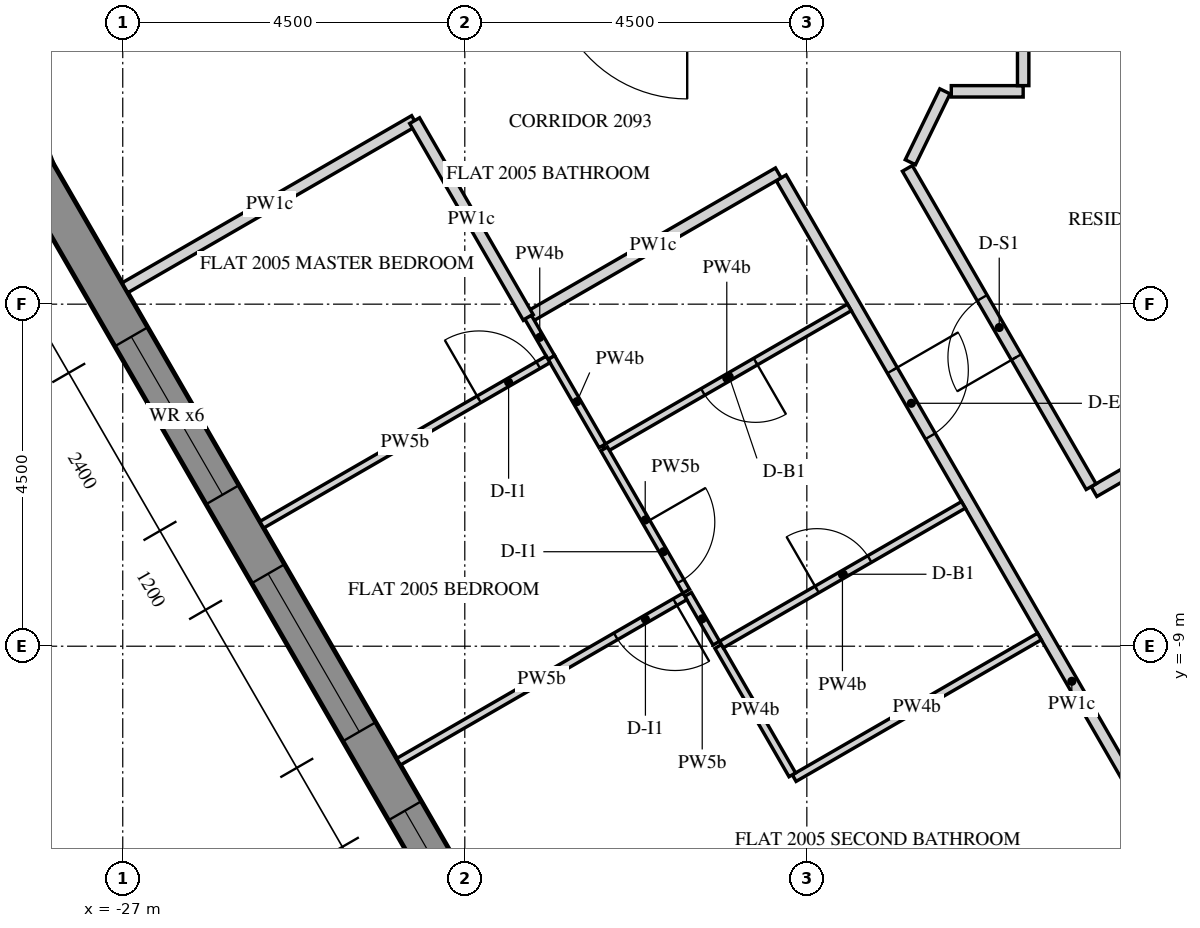
"""IFC4 building model, lengths in metres.
Left out: names, types, materials, properties, quantities, classifications, styles, units other than length and angle.
Written with IfcOpenShell. Run it as: python <this file> out.ifc"""

import sys

from ifc_helpers import new_model, si_unit, direction, frame, frame_2d, origin, place, context, subcontext, project, spatial, polyline, rectangle, outline, extrude, element, fill, save


model = new_model("IFC4")
c1 = context("Model", 3, precision=1e-05, world=origin(), true_north=direction((0.0, 1.0)))
c2 = subcontext(c1, "Body", "Model", "MODEL_VIEW")
j1 = project(units=[si_unit("LENGTHUNIT", "METRE"), si_unit("PLANEANGLEUNIT", "RADIAN")], contexts=[c1])
p1 = place(None, origin())
s1 = spatial("IfcSite", under=j1, at=p1, CompositionType="ELEMENT")
p2 = place(p1, origin())
s2 = spatial("IfcBuilding", under=s1, at=p2, CompositionType="ELEMENT")
p3 = place(p2, frame((0.0, 0.0, 260.1)))
s3 = spatial("IfcBuildingStorey", under=s2, at=p3, CompositionType="ELEMENT", Elevation=260.1)
p4 = place(p3, frame((-28.578, -1.606, -0.15), z_axis=(0.0, 0.0, 1.0), x_axis=(0.352838463023, -0.935684251771, 0.0)))
e1 = element("IfcWall", 1, at=p4, inside=s3, PredefinedType="SOLIDWALL", context=c2, shape_type="SweptSolid", body=[
    extrude(outline(polyline([(-0.041, -0.25), (1.237, -0.25), (1.196, 0.25), (0.041, 0.25), (-0.041, -0.25)])), origin(), (0.0, 0.0, 1.0), 3.9),
])
p5 = place(p3, frame((-28.149, -2.745, -0.15), z_axis=(0.0, 0.0, 1.0), x_axis=(0.500003737743, -0.866023245787, 0.0)))
e2 = element("IfcWall", 2, at=p5, inside=s3, PredefinedType="SOLIDWALL", context=c2, shape_type="SweptSolid", body=[
    extrude(outline(polyline([(-0.021, -0.25), (25.468, -0.25), (25.421, 0.25), (0.021, 0.25), (-0.021, -0.25)])), origin(), (0.0, 0.0, 1.0), 3.9),
])
p6 = place(p5, frame((2.522, 0.0, 0.75)))
e3 = element("IfcOpeningElement", 3, at=p6, cuts=e2, PredefinedType="OPENING", context=c2, shape_type="SweptSolid", body=[
    extrude(rectangle(XDim=2.4, YDim=2.7, at=frame_2d((1.2, 1.35))), frame((0.0, 0.26, 0.0), z_axis=(0.0, -1.0, 0.0), x_axis=(1.0, 0.0, 0.0)), (0.0, 0.0, 1.0), 0.52),
])
p7 = place(p5, frame((6.122, 0.0, 0.75)))
e4 = element("IfcOpeningElement", 4, at=p7, cuts=e2, PredefinedType="OPENING", context=c2, shape_type="SweptSolid", body=[
    extrude(rectangle(XDim=2.4, YDim=2.7, at=frame_2d((1.2, 1.35))), frame((0.0, 0.26, 0.0), z_axis=(0.0, -1.0, 0.0), x_axis=(1.0, 0.0, 0.0)), (0.0, 0.0, 1.0), 0.52),
])
p8 = place(p5, frame((9.722, 0.0, 0.75)))
e5 = element("IfcOpeningElement", 5, at=p8, cuts=e2, PredefinedType="OPENING", context=c2, shape_type="SweptSolid", body=[
    extrude(rectangle(XDim=2.4, YDim=2.7, at=frame_2d((1.2, 1.35))), frame((0.0, 0.26, 0.0), z_axis=(0.0, -1.0, 0.0), x_axis=(1.0, 0.0, 0.0)), (0.0, 0.0, 1.0), 0.52),
])
p9 = place(p5, frame((13.323, 0.0, 0.75)))
e6 = element("IfcOpeningElement", 6, at=p9, cuts=e2, PredefinedType="OPENING", context=c2, shape_type="SweptSolid", body=[
    extrude(rectangle(XDim=2.4, YDim=2.7, at=frame_2d((1.2, 1.35))), frame((0.0, 0.26, 0.0), z_axis=(0.0, -1.0, 0.0), x_axis=(1.0, 0.0, 0.0)), (0.0, 0.0, 1.0), 0.52),
])
p10 = place(p5, frame((16.922, 0.0, 0.75)))
e7 = element("IfcOpeningElement", 7, at=p10, cuts=e2, PredefinedType="OPENING", context=c2, shape_type="SweptSolid", body=[
    extrude(rectangle(XDim=2.4, YDim=2.7, at=frame_2d((1.2, 1.35))), frame((0.0, 0.26, 0.0), z_axis=(0.0, -1.0, 0.0), x_axis=(1.0, 0.0, 0.0)), (0.0, 0.0, 1.0), 0.52),
])
p11 = place(p5, frame((20.522, 0.0, 0.75)))
e8 = element("IfcOpeningElement", 8, at=p11, cuts=e2, PredefinedType="OPENING", context=c2, shape_type="SweptSolid", body=[
    extrude(rectangle(XDim=2.4, YDim=2.7, at=frame_2d((1.2, 1.35))), frame((0.0, 0.26, 0.0), z_axis=(0.0, -1.0, 0.0), x_axis=(1.0, 0.0, 0.0)), (0.0, 0.0, 1.0), 0.52),
])
p12 = place(p3, frame((-18.338, -2.838, 0.0), z_axis=(0.0, 0.0, 1.0), x_axis=(0.499999693481, -0.866025580753, 0.0)))
e9 = element("IfcWall", 9, at=p12, inside=s3, PredefinedType="PARTITIONING", context=c2, shape_type="SweptSolid", body=[
    extrude(rectangle(XDim=15.296, YDim=0.15, at=frame_2d((7.648, 0.0))), origin(), (0.0, 0.0, 1.0), 2.823),
])
p13 = place(p12, frame((2.925, 0.0, 0.0)))
e10 = element("IfcOpeningElement", 10, at=p13, cuts=e9, PredefinedType="OPENING", context=c2, shape_type="SweptSolid", body=[
    extrude(rectangle(XDim=1.0, YDim=2.1, at=frame_2d((0.5, 1.05))), frame((0.0, 0.085, 0.0), z_axis=(0.0, -1.0, 0.0), x_axis=(1.0, 0.0, 0.0)), (0.0, 0.0, 1.0), 0.17),
])
p14 = place(p12, frame((14.136, 0.0, 0.0)))
e11 = element("IfcOpeningElement", 11, at=p14, cuts=e9, PredefinedType="OPENING", context=c2, shape_type="SweptSolid", body=[
    extrude(rectangle(XDim=1.0, YDim=2.1, at=frame_2d((0.5, 1.05))), frame((0.0, 0.085, 0.0), z_axis=(0.0, -1.0, 0.0), x_axis=(1.0, 0.0, 0.0)), (0.0, 0.0, 1.0), 0.17),
])
p15 = place(p3, frame((-21.666, -4.673, 0.0), z_axis=(0.0, 0.0, 1.0), x_axis=(0.86601654697, 0.500015340139, 0.0)))
e12 = element("IfcWall", 12, at=p15, inside=s3, PredefinedType="PARTITIONING", context=c2, shape_type="SweptSolid", body=[
    extrude(rectangle(XDim=3.8, YDim=0.15, at=frame_2d((1.9, 0.0))), origin(), (0.0, 0.0, 1.0), 2.823),
])
p16 = place(p3, frame((-26.971, -4.284, 0.0), z_axis=(0.0, 0.0, 1.0), x_axis=(0.866010893236, 0.500025132165, 0.0)))
e13 = element("IfcWall", 13, at=p16, inside=s3, PredefinedType="PARTITIONING", context=c2, shape_type="SweptSolid", body=[
    extrude(rectangle(XDim=4.399, YDim=0.15, at=frame_2d((2.199, 0.0))), origin(), (0.0, 0.0, 1.0), 2.823),
])
p17 = place(p3, frame((-23.16, -2.085, 0.0), z_axis=(0.0, 0.0, 1.0), x_axis=(0.499983857782, -0.866034723298, 0.0)))
e14 = element("IfcWall", 14, at=p17, inside=s3, PredefinedType="PARTITIONING", context=c2, shape_type="SweptSolid", body=[
    extrude(rectangle(XDim=2.991, YDim=0.15, at=frame_2d((1.496, 0.0))), origin(), (0.0, 0.0, 1.0), 2.823),
])
p18 = place(p3, frame((-10.066, -4.566, 0.0), z_axis=(0.0, 0.0, 1.0), x_axis=(-0.866037363387, -0.499979284789, 0.0)))
e15 = element("IfcWall", 15, at=p18, inside=s3, PredefinedType="PARTITIONING", context=c2, shape_type="SweptSolid", body=[
    extrude(rectangle(XDim=4.8, YDim=0.15, at=frame_2d((2.4, 0.0))), origin(), (0.0, 0.0, 1.0), 2.823),
])
p19 = place(p3, frame((-14.26, -6.901, 0.0), z_axis=(0.0, 0.0, 1.0), x_axis=(-0.499978899972, 0.866037585549, 0.0)))
e16 = element("IfcWall", 16, at=p19, inside=s3, PredefinedType="PARTITIONING", context=c2, shape_type="SweptSolid", body=[
    extrude(rectangle(XDim=4.835, YDim=0.15, at=frame_2d((2.417, 0.0))), origin(), (0.0, 0.0, 1.0), 2.823),
])
p20 = place(p19, frame((1.967, 0.0, 0.0)))
e17 = element("IfcOpeningElement", 17, at=p20, cuts=e16, PredefinedType="OPENING", context=c2, shape_type="SweptSolid", body=[
    extrude(rectangle(XDim=0.9, YDim=2.1, at=frame_2d((0.45, 1.05))), frame((0.0, 0.085, 0.0), z_axis=(0.0, -1.0, 0.0), x_axis=(1.0, 0.0, 0.0)), (0.0, 0.0, 1.0), 0.17),
])
p21 = place(p3, frame((-16.638, -2.632, 0.0), z_axis=(0.0, 0.0, 1.0), x_axis=(0.438437541994, 0.898761660158, 0.0)))
e18 = element("IfcWall", 18, at=p21, inside=s3, PredefinedType="PARTITIONING", context=c2, shape_type="SweptSolid", body=[
    extrude(rectangle(XDim=1.037, YDim=0.15, at=frame_2d((0.519, 0.0))), origin(), (0.0, 0.0, 1.0), 2.823),
])
p22 = place(p3, frame((-16.1, -1.7, 0.0), z_axis=(0.0, 0.0, 1.0), x_axis=(1.0, 0.0, 0.0)))
e19 = element("IfcWall", 19, at=p22, inside=s3, PredefinedType="PARTITIONING", context=c2, shape_type="SweptSolid", body=[
    extrude(rectangle(XDim=0.946, YDim=0.15, at=frame_2d((0.473, 0.0))), origin(), (0.0, 0.0, 1.0), 2.823),
])
p23 = place(p3, frame((-15.154, -1.625, 0.0), z_axis=(0.0, 0.0, 1.0), x_axis=(0.0, 1.0, 0.0)))
e20 = element("IfcWall", 20, at=p23, inside=s3, PredefinedType="PARTITIONING", context=c2, shape_type="SweptSolid", body=[
    extrude(rectangle(XDim=1.425, YDim=0.15, at=frame_2d((0.712, 0.0))), origin(), (0.0, 0.0, 1.0), 2.823),
])
p24 = place(p3, frame((-19.191, -8.96, 0.0), z_axis=(0.0, 0.0, 1.0), x_axis=(-0.500036104519, 0.866004557827, 0.0)))
e21 = element("IfcWall", 21, at=p24, inside=s3, PredefinedType="PARTITIONING", context=c2, shape_type="SweptSolid", body=[
    extrude(rectangle(XDim=0.741, YDim=0.1, at=frame_2d((0.371, 0.0))), origin(), (0.0, 0.0, 1.0), 2.823),
])
p25 = place(p3, frame((-19.604, -8.345, 0.0), z_axis=(0.0, 0.0, 1.0), x_axis=(-0.866027639635, -0.499996127374, 0.0)))
e22 = element("IfcWall", 22, at=p25, inside=s3, PredefinedType="PARTITIONING", context=c2, shape_type="SweptSolid", body=[
    extrude(rectangle(XDim=4.35, YDim=0.1, at=frame_2d((2.175, 0.0))), origin(), (0.0, 0.0, 1.0), 2.823),
])
p26 = place(p25, frame((0.15, 0.0, 0.0)))
e23 = element("IfcOpeningElement", 23, at=p26, cuts=e22, PredefinedType="OPENING", context=c2, shape_type="SweptSolid", body=[
    extrude(rectangle(XDim=0.9, YDim=2.1, at=frame_2d((0.45, 1.05))), frame((0.0, 0.06, 0.0), z_axis=(0.0, -1.0, 0.0), x_axis=(1.0, 0.0, 0.0)), (0.0, 0.0, 1.0), 0.12),
])
p27 = place(p3, frame((-14.94, -8.873, 0.0), z_axis=(0.0, 0.0, 1.0), x_axis=(-0.866056803351, -0.499945610411, 0.0)))
e24 = element("IfcWall", 24, at=p27, inside=s3, PredefinedType="PARTITIONING", context=c2, shape_type="SweptSolid", body=[
    extrude(rectangle(XDim=3.725, YDim=0.1, at=frame_2d((1.863, 0.0))), origin(), (0.0, 0.0, 1.0), 2.823),
])
p28 = place(p3, frame((-18.191, -10.692, 0.0), z_axis=(0.0, 0.0, 1.0), x_axis=(-0.500043961785, 0.866000020948, 0.0)))
e25 = element("IfcWall", 25, at=p28, inside=s3, PredefinedType="PARTITIONING", context=c2, shape_type="SweptSolid", body=[
    extrude(rectangle(XDim=1.95, YDim=0.1, at=frame_2d((0.975, 0.0))), origin(), (0.0, 0.0, 1.0), 2.823),
])
p29 = place(p3, frame((-17.44, -4.542, 0.0), z_axis=(0.0, 0.0, 1.0), x_axis=(-0.866028424924, -0.499994767197, 0.0)))
e26 = element("IfcWall", 26, at=p29, inside=s3, PredefinedType="PARTITIONING", context=c2, shape_type="SweptSolid", body=[
    extrude(rectangle(XDim=3.725, YDim=0.1, at=frame_2d((1.863, 0.0))), origin(), (0.0, 0.0, 1.0), 2.823),
])
p30 = place(p29, frame((1.425, 0.0, 0.0)))
e27 = element("IfcOpeningElement", 27, at=p30, cuts=e26, PredefinedType="OPENING", context=c2, shape_type="SweptSolid", body=[
    extrude(rectangle(XDim=0.8, YDim=2.1, at=frame_2d((0.4, 1.05))), frame((0.0, 0.06, 0.0), z_axis=(0.0, -1.0, 0.0), x_axis=(1.0, 0.0, 0.0)), (0.0, 0.0, 1.0), 0.12),
])
p31 = place(p3, frame((-20.667, -6.403, 0.0), z_axis=(0.0, 0.0, 1.0), x_axis=(0.499999270699, -0.866025824846, 0.0)))
e28 = element("IfcWall", 28, at=p31, inside=s3, PredefinedType="PARTITIONING", context=c2, shape_type="SweptSolid", body=[
    extrude(rectangle(XDim=2.163, YDim=0.1, at=frame_2d((1.082, 0.0))), origin(), (0.0, 0.0, 1.0), 2.823),
])
p32 = place(p31, frame((1.113, 0.0, 0.0)))
e29 = element("IfcOpeningElement", 29, at=p32, cuts=e28, PredefinedType="OPENING", context=c2, shape_type="SweptSolid", body=[
    extrude(rectangle(XDim=0.9, YDim=2.1, at=frame_2d((0.45, 1.05))), frame((0.0, 0.06, 0.0), z_axis=(0.0, -1.0, 0.0), x_axis=(1.0, 0.0, 0.0)), (0.0, 0.0, 1.0), 0.12),
])
p33 = place(p3, frame((-19.123, -8.978, 0.0), z_axis=(0.0, 0.0, 1.0), x_axis=(0.866006363297, 0.500032977642, 0.0)))
e30 = element("IfcWall", 30, at=p33, inside=s3, PredefinedType="PARTITIONING", context=c2, shape_type="SweptSolid", body=[
    extrude(rectangle(XDim=3.675, YDim=0.1, at=frame_2d((1.837, 0.0))), origin(), (0.0, 0.0, 1.0), 2.823),
])
p34 = place(p33, frame((1.45, 0.0, 0.0)))
e31 = element("IfcOpeningElement", 31, at=p34, cuts=e30, PredefinedType="OPENING", context=c2, shape_type="SweptSolid", body=[
    extrude(rectangle(XDim=0.8, YDim=2.1, at=frame_2d((0.4, 1.05))), frame((0.0, 0.06, 0.0), z_axis=(0.0, -1.0, 0.0), x_axis=(1.0, 0.0, 0.0)), (0.0, 0.0, 1.0), 0.12),
])
p35 = place(p3, frame((-21.667, -4.671, 0.0), z_axis=(0.0, 0.0, 1.0), x_axis=(0.499952348839, -0.866052913447, 0.0)))
e32 = element("IfcWall", 32, at=p35, inside=s3, PredefinedType="PARTITIONING", context=c2, shape_type="SweptSolid", body=[
    extrude(rectangle(XDim=0.613, YDim=0.1, at=frame_2d((0.306, 0.0))), origin(), (0.0, 0.0, 1.0), 2.823),
])
p36 = place(p3, frame((-21.361, -5.202, 0.0), z_axis=(0.0, 0.0, 1.0), x_axis=(0.500074377092, -0.865982457891, 0.0)))
e33 = element("IfcWall", 33, at=p36, inside=s3, PredefinedType="PARTITIONING", context=c2, shape_type="SweptSolid", body=[
    extrude(rectangle(XDim=1.341, YDim=0.1, at=frame_2d((0.67, 0.0))), origin(), (0.0, 0.0, 1.0), 2.823),
])
p37 = place(p3, frame((-25.171, -7.402, 0.0), z_axis=(0.0, 0.0, 1.0), x_axis=(0.866013608182, 0.500020430026, 0.0)))
e34 = element("IfcWall", 34, at=p37, inside=s3, PredefinedType="PARTITIONING", context=c2, shape_type="SweptSolid", body=[
    extrude(rectangle(XDim=4.35, YDim=0.1, at=frame_2d((2.175, 0.0))), origin(), (0.0, 0.0, 1.0), 2.823),
])
p38 = place(p37, frame((3.3, 0.0, 0.0)))
e35 = element("IfcOpeningElement", 35, at=p38, cuts=e34, PredefinedType="OPENING", context=c2, shape_type="SweptSolid", body=[
    extrude(rectangle(XDim=0.9, YDim=2.1, at=frame_2d((0.45, 1.05))), frame((0.0, 0.06, 0.0), z_axis=(0.0, -1.0, 0.0), x_axis=(1.0, 0.0, 0.0)), (0.0, 0.0, 1.0), 0.12),
])
p39 = place(p6, frame((0.0, 0.18, 0.0)))
e36 = element("IfcWindow", 36, at=p39, inside=s3, PartitioningType="DOUBLE_PANEL_VERTICAL", PredefinedType="WINDOW", context=c2, shape_type="SweptSolid", body=[
    extrude(rectangle(XDim=2.4, YDim=2.7, at=frame_2d((1.2, 1.35))), frame((0.0, 0.03, 0.0), z_axis=(0.0, -1.0, 0.0), x_axis=(1.0, 0.0, 0.0)), (0.0, 0.0, 1.0), 0.06),
])
fill(e3, e36)
p40 = place(p7, frame((0.0, 0.18, 0.0)))
e37 = element("IfcWindow", 37, at=p40, inside=s3, PartitioningType="DOUBLE_PANEL_VERTICAL", PredefinedType="WINDOW", context=c2, shape_type="SweptSolid", body=[
    extrude(rectangle(XDim=2.4, YDim=2.7, at=frame_2d((1.2, 1.35))), frame((0.0, 0.03, 0.0), z_axis=(0.0, -1.0, 0.0), x_axis=(1.0, 0.0, 0.0)), (0.0, 0.0, 1.0), 0.06),
])
fill(e4, e37)
p41 = place(p8, frame((0.0, 0.18, 0.0)))
e38 = element("IfcWindow", 38, at=p41, inside=s3, PartitioningType="DOUBLE_PANEL_VERTICAL", PredefinedType="WINDOW", context=c2, shape_type="SweptSolid", body=[
    extrude(rectangle(XDim=2.4, YDim=2.7, at=frame_2d((1.2, 1.35))), frame((0.0, 0.03, 0.0), z_axis=(0.0, -1.0, 0.0), x_axis=(1.0, 0.0, 0.0)), (0.0, 0.0, 1.0), 0.06),
])
fill(e5, e38)
p42 = place(p13, origin())
e39 = element("IfcDoor", 39, at=p42, inside=s3, OperationType="SINGLE_SWING_RIGHT", PredefinedType="DOOR", context=c2, shape_type="SweptSolid", body=[
    extrude(rectangle(XDim=1.0, YDim=2.1, at=frame_2d((0.5, 1.05))), frame((0.0, 0.025, 0.0), z_axis=(0.0, -1.0, 0.0), x_axis=(1.0, 0.0, 0.0)), (0.0, 0.0, 1.0), 0.05),
])
fill(e10, e39)
p43 = place(p30, origin())
e40 = element("IfcDoor", 40, at=p43, inside=s3, OperationType="SINGLE_SWING_RIGHT", PredefinedType="DOOR", context=c2, shape_type="SweptSolid", body=[
    extrude(rectangle(XDim=0.8, YDim=2.1, at=frame_2d((0.4, 1.05))), frame((0.0, 0.025, 0.0), z_axis=(0.0, -1.0, 0.0), x_axis=(1.0, 0.0, 0.0)), (0.0, 0.0, 1.0), 0.05),
])
fill(e27, e40)
p44 = place(p32, origin())
e41 = element("IfcDoor", 41, at=p44, inside=s3, OperationType="SINGLE_SWING_RIGHT", PredefinedType="DOOR", context=c2, shape_type="SweptSolid", body=[
    extrude(rectangle(XDim=0.9, YDim=2.1, at=frame_2d((0.45, 1.05))), frame((0.0, 0.025, 0.0), z_axis=(0.0, -1.0, 0.0), x_axis=(1.0, 0.0, 0.0)), (0.0, 0.0, 1.0), 0.05),
])
fill(e29, e41)
p45 = place(p38, origin())
e42 = element("IfcDoor", 42, at=p45, inside=s3, OperationType="SINGLE_SWING_RIGHT", PredefinedType="DOOR", context=c2, shape_type="SweptSolid", body=[
    extrude(rectangle(XDim=0.9, YDim=2.1, at=frame_2d((0.45, 1.05))), frame((0.0, 0.025, 0.0), z_axis=(0.0, -1.0, 0.0), x_axis=(1.0, 0.0, 0.0)), (0.0, 0.0, 1.0), 0.05),
])
fill(e35, e42)
p46 = place(p26, origin())
e43 = element("IfcDoor", 43, at=p46, inside=s3, OperationType="SINGLE_SWING_RIGHT", PredefinedType="DOOR", context=c2, shape_type="SweptSolid", body=[
    extrude(rectangle(XDim=0.9, YDim=2.1, at=frame_2d((0.45, 1.05))), frame((0.0, 0.025, 0.0), z_axis=(0.0, -1.0, 0.0), x_axis=(1.0, 0.0, 0.0)), (0.0, 0.0, 1.0), 0.05),
])
fill(e23, e43)
p47 = place(p34, origin())
e44 = element("IfcDoor", 44, at=p47, inside=s3, OperationType="SINGLE_SWING_LEFT", PredefinedType="DOOR", context=c2, shape_type="SweptSolid", body=[
    extrude(rectangle(XDim=0.8, YDim=2.1, at=frame_2d((0.4, 1.05))), frame((0.0, 0.025, 0.0), z_axis=(0.0, -1.0, 0.0), x_axis=(1.0, 0.0, 0.0)), (0.0, 0.0, 1.0), 0.05),
])
fill(e31, e44)
p48 = place(p20, origin())
e45 = element("IfcDoor", 45, at=p48, inside=s3, OperationType="SINGLE_SWING_RIGHT", PredefinedType="DOOR", context=c2, shape_type="SweptSolid", body=[
    extrude(rectangle(XDim=0.9, YDim=2.1, at=frame_2d((0.45, 1.05))), frame((0.0, 0.025, 0.0), z_axis=(0.0, -1.0, 0.0), x_axis=(1.0, 0.0, 0.0)), (0.0, 0.0, 1.0), 0.05),
])
fill(e17, e45)
save(model, sys.argv[1])
